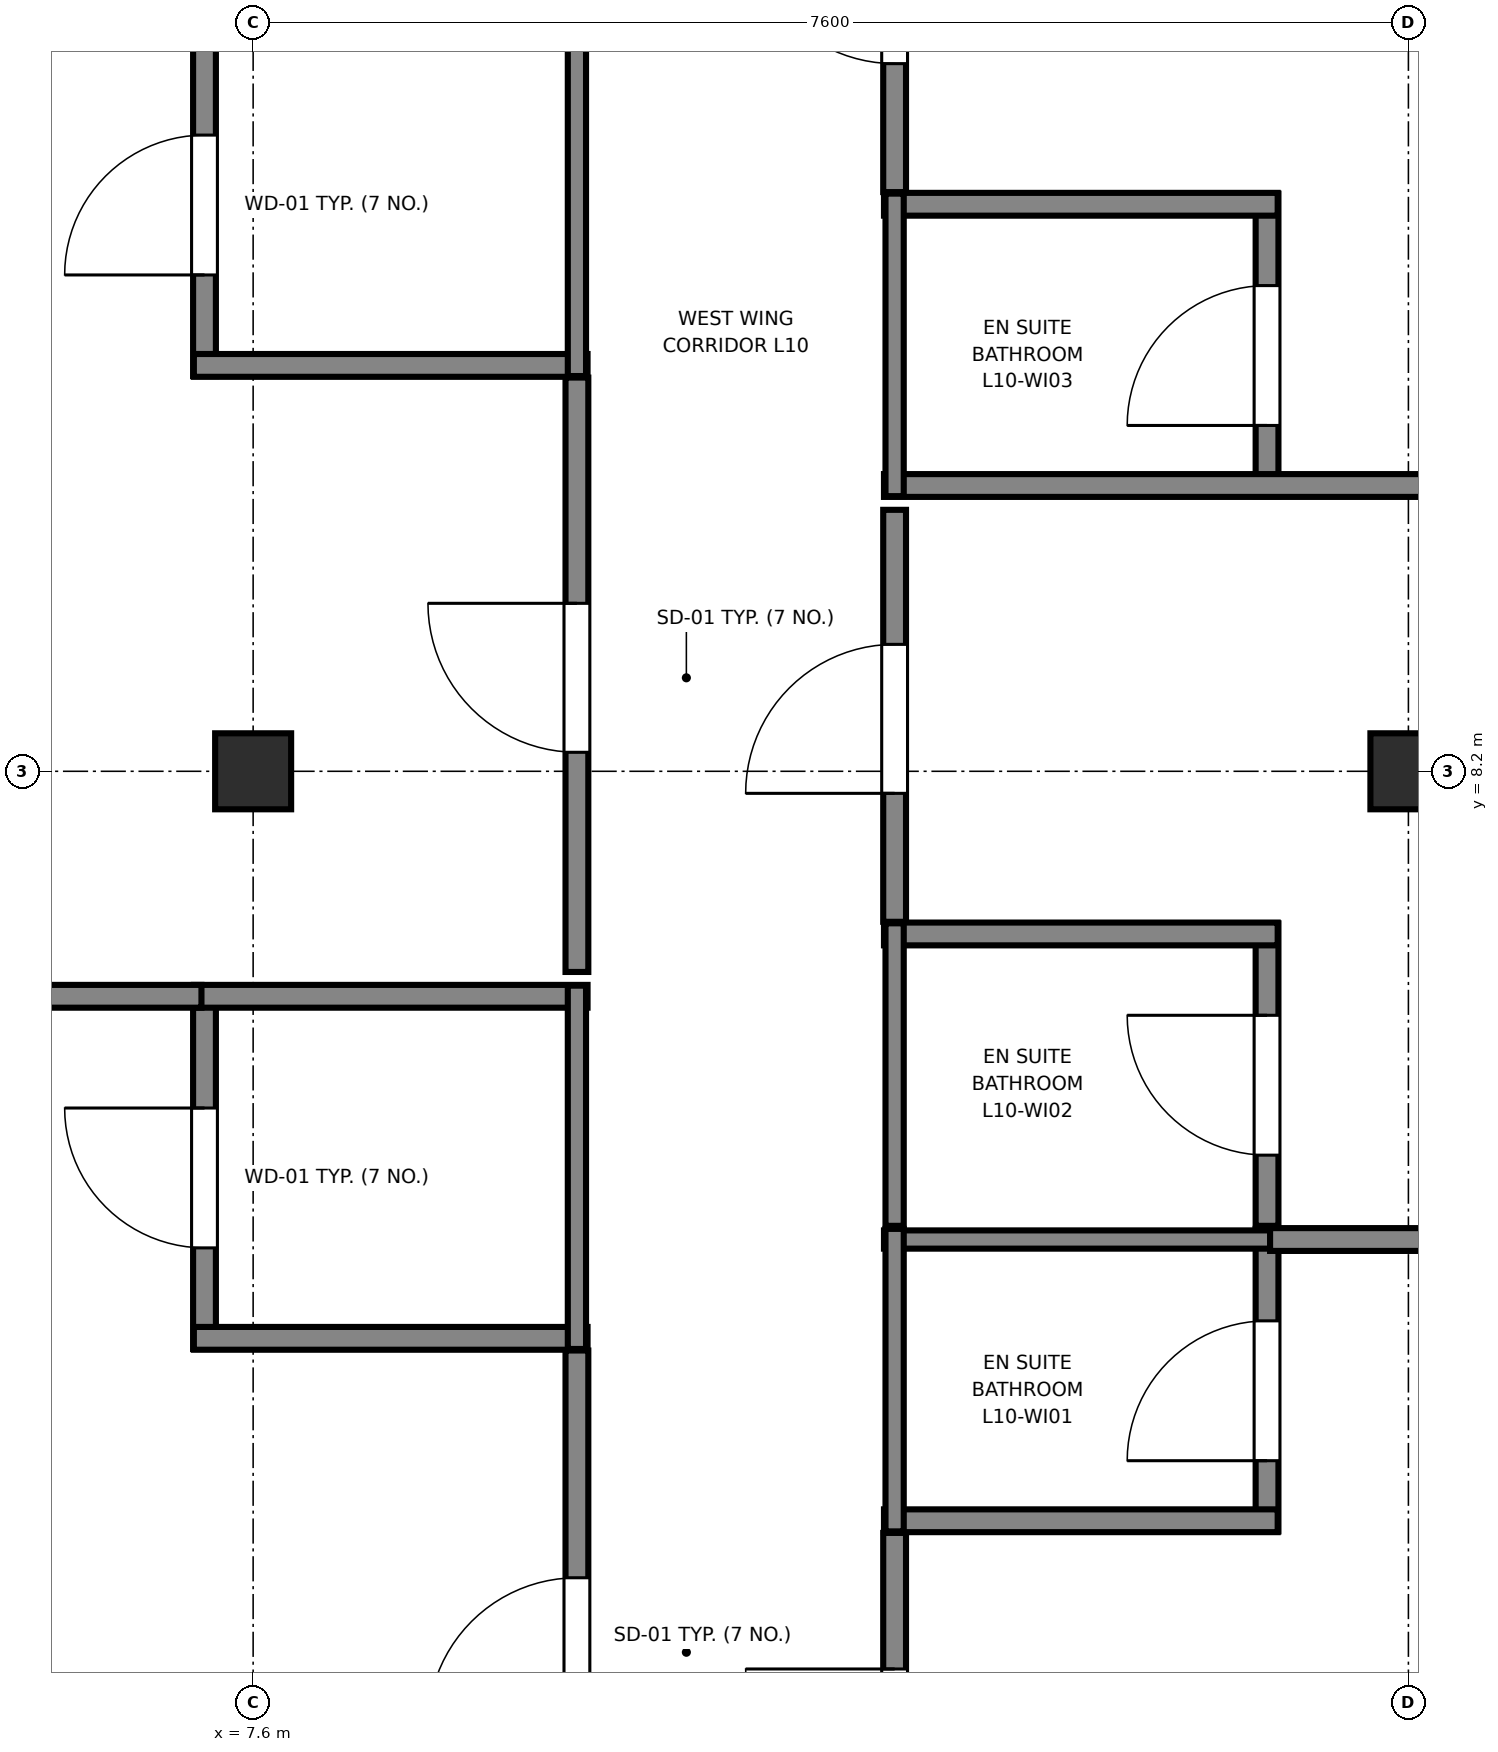
"""IFC4 building model, lengths in metres.
Left out: names, types, materials, properties, quantities, classifications, styles, units other than length and angle.
Written with IfcOpenShell. Run it as: python <this file> out.ifc"""

import sys

from ifc_helpers import new_model, si_unit, direction, frame, frame_2d, origin, origin_2d, place, context, subcontext, project, spatial, rectangle, i_section, extrude, source, transform, mapped, element, fill, save


model = new_model("IFC4")
c1 = context("Model", 3, precision=1e-05, world=origin(), true_north=direction((0.0, 1.0)))
c2 = subcontext(c1, "Body", "Model", "MODEL_VIEW")
j1 = project(units=[si_unit("LENGTHUNIT", "METRE"), si_unit("PLANEANGLEUNIT", "RADIAN")], contexts=[c1])
p1 = place(None, origin())
s1 = spatial("IfcSite", under=j1, at=p1, CompositionType="ELEMENT")
p2 = place(p1, origin())
s2 = spatial("IfcBuilding", under=s1, at=p2, CompositionType="ELEMENT")
p3 = place(p2, frame((0.0, 0.0, 46.2)))
s3 = spatial("IfcBuildingStorey", under=s2, at=p3, CompositionType="ELEMENT", Elevation=46.2)
m1 = source(origin(), c2, "Body", "SweptSolid", [
    extrude(i_section(OverallWidth=0.5, OverallDepth=0.5, WebThickness=0.028, FlangeThickness=0.045, at=origin_2d()), origin(), (0.0, 0.0, 1.0), 3.55),
])
for number, where, z_axis, x_axis in (
    (1, (7.6, 8.2, 0.0), (0.0, 0.0, 1.0), (1.0, 0.0, 0.0)),
    (2, (15.2, 8.2, 0.0), (0.0, 0.0, 1.0), (1.0, 0.0, 0.0)),
):
    element("IfcColumn", number, at=place(p3, frame(where, z_axis=z_axis, x_axis=x_axis)), inside=s3, PredefinedType="COLUMN", context=c2, shape_type="MappedRepresentation", body=[
        mapped(m1, transform((0.0, 0.0, 0.0), x_axis=(1.0, 0.0, 0.0), y_axis=(0.0, 1.0, 0.0), z_axis=(0.0, 0.0, 1.0), scale=1.0)),
    ])
p4 = place(p3, frame((7.28, 4.4, 0.0), z_axis=(0.0, 0.0, 1.0), x_axis=(0.0, 1.0, 0.0)))
e3 = element("IfcWall", 3, at=p4, inside=s3, PredefinedType="PARTITIONING", context=c2, shape_type="SweptSolid", body=[
    extrude(rectangle(XDim=2.39, YDim=0.15, at=frame_2d((1.195, 0.0))), origin(), (0.0, 0.0, 1.0), 3.37),
])
p5 = place(p4, frame((0.665, 0.0, 0.0)))
e4 = element("IfcOpeningElement", 4, at=p5, cuts=e3, PredefinedType="OPENING", context=c2, shape_type="SweptSolid", body=[
    extrude(rectangle(XDim=0.92, YDim=2.01, at=frame_2d((0.46, 1.005))), frame((0.0, 0.085, 0.0), z_axis=(0.0, -1.0, 0.0), x_axis=(1.0, 0.0, 0.0)), (0.0, 0.0, 1.0), 0.17),
])
for number, where, z_axis, x_axis in (
    (5, (7.21, 4.47, 0.0), (0.0, 0.0, 1.0), (1.0, 0.0, 0.0)),
    (6, (7.21, 6.72, 0.0), (0.0, 0.0, 1.0), (1.0, 0.0, 0.0)),
):
    element("IfcWall", number, at=place(p3, frame(where, z_axis=z_axis, x_axis=x_axis)), inside=s3, PredefinedType="PARTITIONING", context=c2, shape_type="SweptSolid", body=[
        extrude(rectangle(XDim=2.59, YDim=0.15, at=frame_2d((1.295, 0.0))), origin(), (0.0, 0.0, 1.0), 3.37),
    ])
p6 = place(p3, frame((9.73, 4.4, 0.0), z_axis=(0.0, 0.0, 1.0), x_axis=(0.0, 1.0, 0.0)))
e7 = element("IfcWall", 7, at=p6, inside=s3, PredefinedType="PLUMBINGWALL", context=c2, shape_type="SweptSolid", body=[
    extrude(rectangle(XDim=2.39, YDim=0.12, at=frame_2d((1.195, 0.0))), origin(), (0.0, 0.0, 1.0), 3.37),
])
p7 = place(p3, frame((7.28, 10.8, 0.0), z_axis=(0.0, 0.0, 1.0), x_axis=(0.0, 1.0, 0.0)))
e8 = element("IfcWall", 8, at=p7, inside=s3, PredefinedType="PARTITIONING", context=c2, shape_type="SweptSolid", body=[
    extrude(rectangle(XDim=2.39, YDim=0.15, at=frame_2d((1.195, 0.0))), origin(), (0.0, 0.0, 1.0), 3.37),
])
p8 = place(p7, frame((0.665, 0.0, 0.0)))
e9 = element("IfcOpeningElement", 9, at=p8, cuts=e8, PredefinedType="OPENING", context=c2, shape_type="SweptSolid", body=[
    extrude(rectangle(XDim=0.92, YDim=2.01, at=frame_2d((0.46, 1.005))), frame((0.0, 0.085, 0.0), z_axis=(0.0, -1.0, 0.0), x_axis=(1.0, 0.0, 0.0)), (0.0, 0.0, 1.0), 0.17),
])
p9 = place(p3, frame((7.21, 10.87, 0.0), z_axis=(0.0, 0.0, 1.0), x_axis=(1.0, 0.0, 0.0)))
e10 = element("IfcWall", 10, at=p9, inside=s3, PredefinedType="PARTITIONING", context=c2, shape_type="SweptSolid", body=[
    extrude(rectangle(XDim=2.59, YDim=0.15, at=frame_2d((1.295, 0.0))), origin(), (0.0, 0.0, 1.0), 3.37),
])
p10 = place(p3, frame((9.73, 10.8, 0.0), z_axis=(0.0, 0.0, 1.0), x_axis=(0.0, 1.0, 0.0)))
e11 = element("IfcWall", 11, at=p10, inside=s3, PredefinedType="PLUMBINGWALL", context=c2, shape_type="SweptSolid", body=[
    extrude(rectangle(XDim=2.39, YDim=0.12, at=frame_2d((1.195, 0.0))), origin(), (0.0, 0.0, 1.0), 3.37),
])
p11 = place(p3, frame((14.27, 3.2, 0.0), z_axis=(0.0, 0.0, 1.0), x_axis=(0.0, 1.0, 0.0)))
e12 = element("IfcWall", 12, at=p11, inside=s3, PredefinedType="PARTITIONING", context=c2, shape_type="SweptSolid", body=[
    extrude(rectangle(XDim=1.99, YDim=0.15, at=frame_2d((0.995, 0.0))), origin(), (0.0, 0.0, 1.0), 3.37),
])
p12 = place(p11, frame((0.465, 0.0, 0.0)))
e13 = element("IfcOpeningElement", 13, at=p12, cuts=e12, PredefinedType="OPENING", context=c2, shape_type="SweptSolid", body=[
    extrude(rectangle(XDim=0.92, YDim=2.01, at=frame_2d((0.46, 1.005))), frame((0.0, 0.085, 0.0), z_axis=(0.0, -1.0, 0.0), x_axis=(1.0, 0.0, 0.0)), (0.0, 0.0, 1.0), 0.17),
])
p13 = place(p3, frame((11.75, 3.27, 0.0), z_axis=(0.0, 0.0, 1.0), x_axis=(1.0, 0.0, 0.0)))
e14 = element("IfcWall", 14, at=p13, inside=s3, PredefinedType="PARTITIONING", context=c2, shape_type="SweptSolid", body=[
    extrude(rectangle(XDim=2.59, YDim=0.15, at=frame_2d((1.295, 0.0))), origin(), (0.0, 0.0, 1.0), 3.37),
])
p14 = place(p3, frame((11.75, 5.12, 0.0), z_axis=(0.0, 0.0, 1.0), x_axis=(1.0, 0.0, 0.0)))
e15 = element("IfcWall", 15, at=p14, inside=s3, PredefinedType="PLUMBINGWALL", context=c2, shape_type="SweptSolid", body=[
    extrude(rectangle(XDim=2.59, YDim=0.12, at=frame_2d((1.295, 0.0))), origin(), (0.0, 0.0, 1.0), 3.37),
])
p15 = place(p3, frame((11.82, 3.2, 0.0), z_axis=(0.0, 0.0, 1.0), x_axis=(0.0, 1.0, 0.0)))
e16 = element("IfcWall", 16, at=p15, inside=s3, PredefinedType="PLUMBINGWALL", context=c2, shape_type="SweptSolid", body=[
    extrude(rectangle(XDim=1.99, YDim=0.12, at=frame_2d((0.995, 0.0))), origin(), (0.0, 0.0, 1.0), 3.37),
])
p16 = place(p3, frame((14.27, 5.21, 0.0), z_axis=(0.0, 0.0, 1.0), x_axis=(0.0, 1.0, 0.0)))
e17 = element("IfcWall", 17, at=p16, inside=s3, PredefinedType="PARTITIONING", context=c2, shape_type="SweptSolid", body=[
    extrude(rectangle(XDim=1.99, YDim=0.15, at=frame_2d((0.995, 0.0))), origin(), (0.0, 0.0, 1.0), 3.37),
])
p17 = place(p16, frame((0.465, 0.0, 0.0)))
e18 = element("IfcOpeningElement", 18, at=p17, cuts=e17, PredefinedType="OPENING", context=c2, shape_type="SweptSolid", body=[
    extrude(rectangle(XDim=0.92, YDim=2.01, at=frame_2d((0.46, 1.005))), frame((0.0, 0.085, 0.0), z_axis=(0.0, -1.0, 0.0), x_axis=(1.0, 0.0, 0.0)), (0.0, 0.0, 1.0), 0.17),
])
p18 = place(p3, frame((11.75, 7.13, 0.0), z_axis=(0.0, 0.0, 1.0), x_axis=(1.0, 0.0, 0.0)))
e19 = element("IfcWall", 19, at=p18, inside=s3, PredefinedType="PARTITIONING", context=c2, shape_type="SweptSolid", body=[
    extrude(rectangle(XDim=2.59, YDim=0.15, at=frame_2d((1.295, 0.0))), origin(), (0.0, 0.0, 1.0), 3.37),
])
p19 = place(p3, frame((11.82, 5.21, 0.0), z_axis=(0.0, 0.0, 1.0), x_axis=(0.0, 1.0, 0.0)))
e20 = element("IfcWall", 20, at=p19, inside=s3, PredefinedType="PLUMBINGWALL", context=c2, shape_type="SweptSolid", body=[
    extrude(rectangle(XDim=1.99, YDim=0.12, at=frame_2d((0.995, 0.0))), origin(), (0.0, 0.0, 1.0), 3.37),
])
p20 = place(p3, frame((14.27, 10.01, 0.0), z_axis=(0.0, 0.0, 1.0), x_axis=(0.0, 1.0, 0.0)))
e21 = element("IfcWall", 21, at=p20, inside=s3, PredefinedType="PARTITIONING", context=c2, shape_type="SweptSolid", body=[
    extrude(rectangle(XDim=1.99, YDim=0.15, at=frame_2d((0.995, 0.0))), origin(), (0.0, 0.0, 1.0), 3.37),
])
p21 = place(p20, frame((0.465, 0.0, 0.0)))
e22 = element("IfcOpeningElement", 22, at=p21, cuts=e21, PredefinedType="OPENING", context=c2, shape_type="SweptSolid", body=[
    extrude(rectangle(XDim=0.92, YDim=2.01, at=frame_2d((0.46, 1.005))), frame((0.0, 0.085, 0.0), z_axis=(0.0, -1.0, 0.0), x_axis=(1.0, 0.0, 0.0)), (0.0, 0.0, 1.0), 0.17),
])
p22 = place(p3, frame((11.75, 10.08, 0.0), z_axis=(0.0, 0.0, 1.0), x_axis=(1.0, 0.0, 0.0)))
e23 = element("IfcWall", 23, at=p22, inside=s3, PredefinedType="PARTITIONING", context=c2, shape_type="SweptSolid", body=[
    extrude(rectangle(XDim=10.6, YDim=0.15, at=frame_2d((5.3, 0.0))), origin(), (0.0, 0.0, 1.0), 3.37),
])
p23 = place(p3, frame((11.75, 11.93, 0.0), z_axis=(0.0, 0.0, 1.0), x_axis=(1.0, 0.0, 0.0)))
e24 = element("IfcWall", 24, at=p23, inside=s3, PredefinedType="PARTITIONING", context=c2, shape_type="SweptSolid", body=[
    extrude(rectangle(XDim=2.59, YDim=0.15, at=frame_2d((1.295, 0.0))), origin(), (0.0, 0.0, 1.0), 3.37),
])
p24 = place(p3, frame((11.82, 10.01, 0.0), z_axis=(0.0, 0.0, 1.0), x_axis=(0.0, 1.0, 0.0)))
e25 = element("IfcWall", 25, at=p24, inside=s3, PredefinedType="PLUMBINGWALL", context=c2, shape_type="SweptSolid", body=[
    extrude(rectangle(XDim=1.99, YDim=0.12, at=frame_2d((0.995, 0.0))), origin(), (0.0, 0.0, 1.0), 3.37),
])
p25 = place(p3, frame((9.73, 0.405, 0.0), z_axis=(0.0, 0.0, 1.0), x_axis=(0.0, 1.0, 0.0)))
e26 = element("IfcWall", 26, at=p25, inside=s3, PredefinedType="PARTITIONING", context=c2, shape_type="SweptSolid", body=[
    extrude(rectangle(XDim=3.985, YDim=0.15, at=frame_2d((1.992, 0.0))), origin(), (0.0, 0.0, 1.0), 3.37),
])
p26 = place(p25, frame((1.51, 0.0, 0.0)))
e27 = element("IfcOpeningElement", 27, at=p26, cuts=e26, PredefinedType="OPENING", context=c2, shape_type="SweptSolid", body=[
    extrude(rectangle(XDim=0.98, YDim=2.12, at=frame_2d((0.49, 1.06))), frame((0.0, 0.085, 0.0), z_axis=(0.0, -1.0, 0.0), x_axis=(1.0, 0.0, 0.0)), (0.0, 0.0, 1.0), 0.17),
])
p27 = place(p3, frame((0.405, 6.72, 0.0), z_axis=(0.0, 0.0, 1.0), x_axis=(1.0, 0.0, 0.0)))
e28 = element("IfcWall", 28, at=p27, inside=s3, PredefinedType="PARTITIONING", context=c2, shape_type="SweptSolid", body=[
    extrude(rectangle(XDim=6.855, YDim=0.15, at=frame_2d((3.427, 0.0))), origin(), (0.0, 0.0, 1.0), 3.37),
])
p28 = place(p3, frame((9.73, 6.88, 0.0), z_axis=(0.0, 0.0, 1.0), x_axis=(0.0, 1.0, 0.0)))
e29 = element("IfcWall", 29, at=p28, inside=s3, PredefinedType="PARTITIONING", context=c2, shape_type="SweptSolid", body=[
    extrude(rectangle(XDim=3.91, YDim=0.15, at=frame_2d((1.955, 0.0))), origin(), (0.0, 0.0, 1.0), 3.37),
])
p29 = place(p28, frame((1.445, 0.0, 0.0)))
e30 = element("IfcOpeningElement", 30, at=p29, cuts=e29, PredefinedType="OPENING", context=c2, shape_type="SweptSolid", body=[
    extrude(rectangle(XDim=0.98, YDim=2.12, at=frame_2d((0.49, 1.06))), frame((0.0, 0.085, 0.0), z_axis=(0.0, -1.0, 0.0), x_axis=(1.0, 0.0, 0.0)), (0.0, 0.0, 1.0), 0.17),
])
p30 = place(p3, frame((11.82, 0.405, 0.0), z_axis=(0.0, 0.0, 1.0), x_axis=(0.0, 1.0, 0.0)))
e31 = element("IfcWall", 31, at=p30, inside=s3, PredefinedType="PARTITIONING", context=c2, shape_type="SweptSolid", body=[
    extrude(rectangle(XDim=2.785, YDim=0.15, at=frame_2d((1.393, 0.0))), origin(), (0.0, 0.0, 1.0), 3.37),
])
p31 = place(p30, frame((0.91, 0.0, 0.0)))
e32 = element("IfcOpeningElement", 32, at=p31, cuts=e31, PredefinedType="OPENING", context=c2, shape_type="SweptSolid", body=[
    extrude(rectangle(XDim=0.98, YDim=2.12, at=frame_2d((0.49, 1.06))), frame((0.0, 0.085, 0.0), z_axis=(0.0, -1.0, 0.0), x_axis=(1.0, 0.0, 0.0)), (0.0, 0.0, 1.0), 0.17),
])
p32 = place(p3, frame((14.29, 5.12, 0.0), z_axis=(0.0, 0.0, 1.0), x_axis=(1.0, 0.0, 0.0)))
e33 = element("IfcWall", 33, at=p32, inside=s3, PredefinedType="PARTITIONING", context=c2, shape_type="SweptSolid", body=[
    extrude(rectangle(XDim=8.06, YDim=0.15, at=frame_2d((4.03, 0.0))), origin(), (0.0, 0.0, 1.0), 3.37),
])
p33 = place(p3, frame((11.82, 7.21, 0.0), z_axis=(0.0, 0.0, 1.0), x_axis=(0.0, 1.0, 0.0)))
e34 = element("IfcWall", 34, at=p33, inside=s3, PredefinedType="PARTITIONING", context=c2, shape_type="SweptSolid", body=[
    extrude(rectangle(XDim=2.71, YDim=0.15, at=frame_2d((1.355, 0.0))), origin(), (0.0, 0.0, 1.0), 3.37),
])
p34 = place(p33, frame((0.845, 0.0, 0.0)))
e35 = element("IfcOpeningElement", 35, at=p34, cuts=e34, PredefinedType="OPENING", context=c2, shape_type="SweptSolid", body=[
    extrude(rectangle(XDim=0.98, YDim=2.12, at=frame_2d((0.49, 1.06))), frame((0.0, 0.085, 0.0), z_axis=(0.0, -1.0, 0.0), x_axis=(1.0, 0.0, 0.0)), (0.0, 0.0, 1.0), 0.17),
])
p35 = place(p3, frame((11.82, 12.01, 0.0), z_axis=(0.0, 0.0, 1.0), x_axis=(0.0, 1.0, 0.0)))
e36 = element("IfcWall", 36, at=p35, inside=s3, PredefinedType="PARTITIONING", context=c2, shape_type="SweptSolid", body=[
    extrude(rectangle(XDim=2.71, YDim=0.15, at=frame_2d((1.355, 0.0))), origin(), (0.0, 0.0, 1.0), 3.37),
])
p36 = place(p35, frame((0.845, 0.0, 0.0)))
e37 = element("IfcOpeningElement", 37, at=p36, cuts=e36, PredefinedType="OPENING", context=c2, shape_type="SweptSolid", body=[
    extrude(rectangle(XDim=0.98, YDim=2.12, at=frame_2d((0.49, 1.06))), frame((0.0, 0.085, 0.0), z_axis=(0.0, -1.0, 0.0), x_axis=(1.0, 0.0, 0.0)), (0.0, 0.0, 1.0), 0.17),
])
m2 = source(origin(), c2, "Body", "SweptSolid", [
    extrude(rectangle(XDim=0.92, YDim=2.01, at=frame_2d((0.46, 1.005))), frame((0.0, 0.025, 0.0), z_axis=(0.0, -1.0, 0.0), x_axis=(1.0, 0.0, 0.0)), (0.0, 0.0, 1.0), 0.05),
])
p37 = place(p5, origin())
e38 = element("IfcDoor", 38, at=p37, inside=s3, OperationType="SINGLE_SWING_RIGHT", PredefinedType="DOOR", context=c2, shape_type="MappedRepresentation", body=[
    mapped(m2, transform((0.0, 0.0, 0.0), x_axis=(1.0, 0.0, 0.0), y_axis=(0.0, 1.0, 0.0), z_axis=(0.0, 0.0, 1.0), scale=1.0)),
])
fill(e4, e38)
p38 = place(p8, origin())
e39 = element("IfcDoor", 39, at=p38, inside=s3, OperationType="SINGLE_SWING_LEFT", PredefinedType="DOOR", context=c2, shape_type="MappedRepresentation", body=[
    mapped(m2, transform((0.0, 0.0, 0.0), x_axis=(1.0, 0.0, 0.0), y_axis=(0.0, 1.0, 0.0), z_axis=(0.0, 0.0, 1.0), scale=1.0)),
])
fill(e9, e39)
p39 = place(p12, origin())
e40 = element("IfcDoor", 40, at=p39, inside=s3, OperationType="SINGLE_SWING_LEFT", PredefinedType="DOOR", context=c2, shape_type="MappedRepresentation", body=[
    mapped(m2, transform((0.0, 0.0, 0.0), x_axis=(1.0, 0.0, 0.0), y_axis=(0.0, 1.0, 0.0), z_axis=(0.0, 0.0, 1.0), scale=1.0)),
])
fill(e13, e40)
p40 = place(p17, origin())
e41 = element("IfcDoor", 41, at=p40, inside=s3, OperationType="SINGLE_SWING_RIGHT", PredefinedType="DOOR", context=c2, shape_type="MappedRepresentation", body=[
    mapped(m2, transform((0.0, 0.0, 0.0), x_axis=(1.0, 0.0, 0.0), y_axis=(0.0, 1.0, 0.0), z_axis=(0.0, 0.0, 1.0), scale=1.0)),
])
fill(e18, e41)
p41 = place(p21, origin())
e42 = element("IfcDoor", 42, at=p41, inside=s3, OperationType="SINGLE_SWING_LEFT", PredefinedType="DOOR", context=c2, shape_type="MappedRepresentation", body=[
    mapped(m2, transform((0.0, 0.0, 0.0), x_axis=(1.0, 0.0, 0.0), y_axis=(0.0, 1.0, 0.0), z_axis=(0.0, 0.0, 1.0), scale=1.0)),
])
fill(e22, e42)
m3 = source(origin(), c2, "Body", "SweptSolid", [
    extrude(rectangle(XDim=0.98, YDim=2.12, at=frame_2d((0.49, 1.06))), frame((0.0, 0.025, 0.0), z_axis=(0.0, -1.0, 0.0), x_axis=(1.0, 0.0, 0.0)), (0.0, 0.0, 1.0), 0.05),
])
p42 = place(p26, origin())
e43 = element("IfcDoor", 43, at=p42, inside=s3, OperationType="SINGLE_SWING_LEFT", PredefinedType="DOOR", context=c2, shape_type="MappedRepresentation", body=[
    mapped(m3, transform((0.0, 0.0, 0.0), x_axis=(1.0, 0.0, 0.0), y_axis=(0.0, 1.0, 0.0), z_axis=(0.0, 0.0, 1.0), scale=1.0)),
])
fill(e27, e43)
p43 = place(p29, origin())
e44 = element("IfcDoor", 44, at=p43, inside=s3, OperationType="SINGLE_SWING_RIGHT", PredefinedType="DOOR", context=c2, shape_type="MappedRepresentation", body=[
    mapped(m3, transform((0.0, 0.0, 0.0), x_axis=(1.0, 0.0, 0.0), y_axis=(0.0, 1.0, 0.0), z_axis=(0.0, 0.0, 1.0), scale=1.0)),
])
fill(e30, e44)
p44 = place(p31, origin())
e45 = element("IfcDoor", 45, at=p44, inside=s3, OperationType="SINGLE_SWING_RIGHT", PredefinedType="DOOR", context=c2, shape_type="MappedRepresentation", body=[
    mapped(m3, transform((0.0, 0.0, 0.0), x_axis=(1.0, 0.0, 0.0), y_axis=(0.0, 1.0, 0.0), z_axis=(0.0, 0.0, 1.0), scale=1.0)),
])
fill(e32, e45)
p45 = place(p34, origin())
e46 = element("IfcDoor", 46, at=p45, inside=s3, OperationType="SINGLE_SWING_LEFT", PredefinedType="DOOR", context=c2, shape_type="MappedRepresentation", body=[
    mapped(m3, transform((0.0, 0.0, 0.0), x_axis=(1.0, 0.0, 0.0), y_axis=(0.0, 1.0, 0.0), z_axis=(0.0, 0.0, 1.0), scale=1.0)),
])
fill(e35, e46)
p46 = place(p36, origin())
e47 = element("IfcDoor", 47, at=p46, inside=s3, OperationType="SINGLE_SWING_RIGHT", PredefinedType="DOOR", context=c2, shape_type="MappedRepresentation", body=[
    mapped(m3, transform((0.0, 0.0, 0.0), x_axis=(1.0, 0.0, 0.0), y_axis=(0.0, 1.0, 0.0), z_axis=(0.0, 0.0, 1.0), scale=1.0)),
])
fill(e37, e47)
save(model, sys.argv[1])
